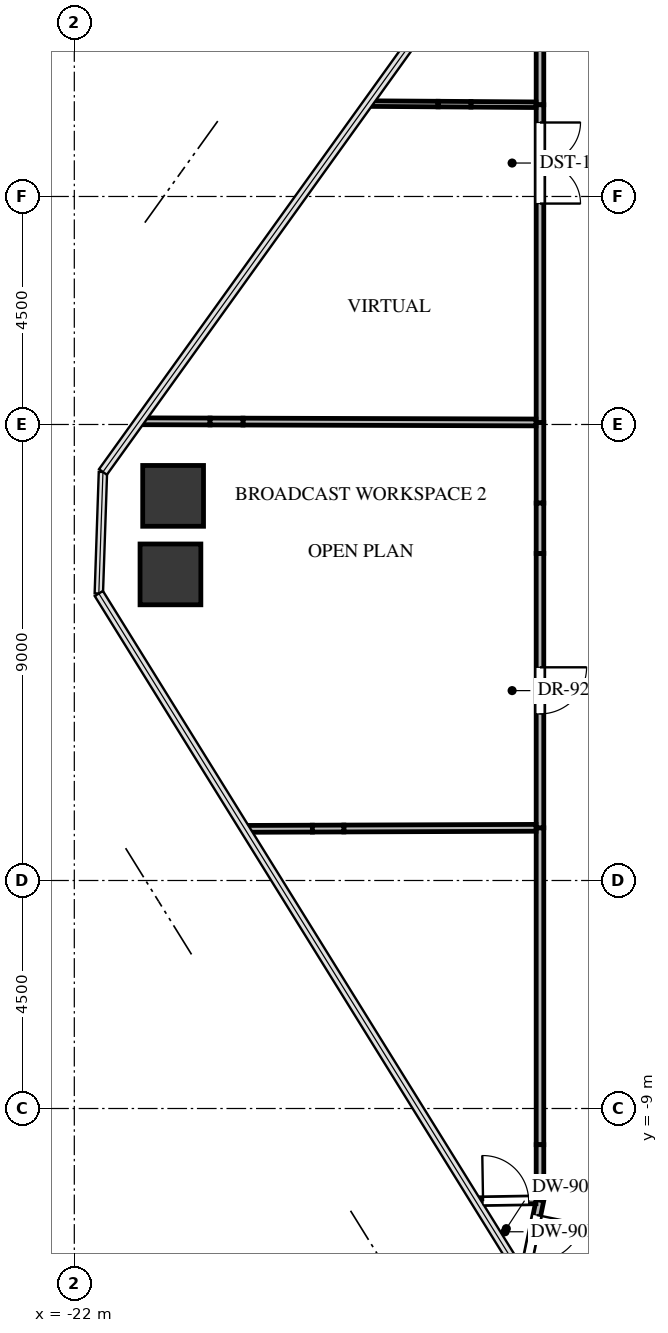
"""IFC4 building model, lengths in metres.
Left out: names, types, materials, properties, quantities, classifications, styles, units other than length and angle.
Written with IfcOpenShell. Run it as: python <this file> out.ifc"""

import sys

from ifc_helpers import new_model, si_unit, direction, frame, frame_2d, origin, origin_2d, place, context, subcontext, project, spatial, rectangle, extrude, source, transform, mapped, element, fill, save


model = new_model("IFC4")
c1 = context("Model", 3, precision=1e-05, world=origin(), true_north=direction((0.0, 1.0)))
c2 = subcontext(c1, "Body", "Model", "MODEL_VIEW")
j1 = project(units=[si_unit("LENGTHUNIT", "METRE"), si_unit("PLANEANGLEUNIT", "RADIAN")], contexts=[c1])
p1 = place(None, origin())
s1 = spatial("IfcSite", under=j1, at=p1, CompositionType="ELEMENT")
p2 = place(p1, origin())
s2 = spatial("IfcBuilding", under=s1, at=p2, CompositionType="ELEMENT")
p3 = place(p2, frame((0.0, 0.0, 137.1)))
s3 = spatial("IfcBuildingStorey", under=s2, at=p3, CompositionType="ELEMENT", Elevation=137.1)
m1 = source(origin(), c2, "Body", "SweptSolid", [
    extrude(rectangle(XDim=1.2, YDim=1.2, at=origin_2d()), origin(), (0.0, 0.0, 1.0), 3.0),
])
for number, where, z_axis, x_axis in (
    (1, (-20.103, 1.542, -0.24), (0.0, 0.0, 1.0), (1.0, 0.0, 0.0)),
    (2, (-20.05, 3.091, -0.24), (0.0, 0.0, 1.0), (1.0, 0.0, 0.0)),
):
    element("IfcColumn", number, at=place(p3, frame(where, z_axis=z_axis, x_axis=x_axis)), inside=s3, PredefinedType="COLUMN", context=c2, shape_type="MappedRepresentation", body=[
        mapped(m1, transform((0.0, 0.0, 0.0), x_axis=(1.0, 0.0, 0.0), y_axis=(0.0, 1.0, 0.0), z_axis=(0.0, 0.0, 1.0), scale=1.0)),
    ])
p4 = place(p3, frame((-12.81, 12.081, 0.0), z_axis=(0.0, 0.0, 1.0), x_axis=(0.0, -1.0, 0.0)))
e3 = element("IfcWall", 3, at=p4, inside=s3, PredefinedType="PARTITIONING", context=c2, shape_type="SweptSolid", body=[
    extrude(rectangle(XDim=1.271, YDim=0.15, at=frame_2d((0.635, 0.0))), origin(), (0.0, 0.0, 1.0), 2.745),
])
p5 = place(p3, frame((-12.81, -10.81, 0.0), z_axis=(0.0, 0.0, 1.0), x_axis=(-0.201786289638, -0.979429575474, 0.0)))
e4 = element("IfcWall", 4, at=p5, inside=s3, PredefinedType="PARTITIONING", context=c2, shape_type="SweptSolid", body=[
    extrude(rectangle(XDim=1.498, YDim=0.15, at=frame_2d((0.749, 0.0))), origin(), (0.0, 0.0, 1.0), 2.745),
])
p6 = place(p5, frame((0.299, 0.0, 0.0)))
e5 = element("IfcOpeningElement", 5, at=p6, cuts=e4, PredefinedType="OPENING", context=c2, shape_type="SweptSolid", body=[
    extrude(rectangle(XDim=0.9, YDim=2.05, at=frame_2d((0.45, 1.025))), frame((0.0, 0.085, 0.0), z_axis=(0.0, -1.0, 0.0), x_axis=(1.0, 0.0, 0.0)), (0.0, 0.0, 1.0), 0.17),
])
p7 = place(p3, frame((-12.81, -3.46, 0.0), z_axis=(0.0, 0.0, 1.0), x_axis=(0.0, -1.0, 0.0)))
e6 = element("IfcWall", 6, at=p7, inside=s3, PredefinedType="PARTITIONING", context=c2, shape_type="SweptSolid", body=[
    extrude(rectangle(XDim=6.254, YDim=0.15, at=frame_2d((3.127, 0.0))), origin(), (0.0, 0.0, 1.0), 2.08),
])
p8 = place(p3, frame((-12.81, -9.714, 0.0), z_axis=(0.0, 0.0, 1.0), x_axis=(0.0, -1.0, 0.0)))
e7 = element("IfcWall", 7, at=p8, inside=s3, PredefinedType="PARTITIONING", context=c2, shape_type="SweptSolid", body=[
    extrude(rectangle(XDim=1.004, YDim=0.15, at=frame_2d((0.502, 0.0))), origin(), (0.0, 0.0, 1.0), 2.08),
])
p9 = place(p3, frame((-12.81, 4.54, 0.0), z_axis=(0.0, 0.0, 1.0), x_axis=(0.0, -1.0, 0.0)))
e8 = element("IfcWall", 8, at=p9, inside=s3, PredefinedType="PARTITIONING", context=c2, shape_type="SweptSolid", body=[
    extrude(rectangle(XDim=1.592, YDim=0.15, at=frame_2d((0.796, 0.0))), origin(), (0.0, 0.0, 1.0), 2.745),
])
p10 = place(p3, frame((-12.81, 1.955, 0.0), z_axis=(0.0, 0.0, 1.0), x_axis=(0.0, -1.0, 0.0)))
e9 = element("IfcWall", 9, at=p10, inside=s3, PredefinedType="PARTITIONING", context=c2, shape_type="SweptSolid", body=[
    extrude(rectangle(XDim=5.415, YDim=0.15, at=frame_2d((2.708, 0.0))), origin(), (0.0, 0.0, 1.0), 2.745),
])
p11 = place(p10, frame((2.248, 0.0, 0.0)))
e10 = element("IfcOpeningElement", 10, at=p11, cuts=e9, PredefinedType="OPENING", context=c2, shape_type="SweptSolid", body=[
    extrude(rectangle(XDim=0.92, YDim=2.1, at=frame_2d((0.46, 1.05))), frame((0.0, 0.085, 0.0), z_axis=(0.0, -1.0, 0.0), x_axis=(1.0, 0.0, 0.0)), (0.0, 0.0, 1.0), 0.17),
])
p12 = place(p3, frame((-12.81, 2.948, 0.0), z_axis=(0.0, 0.0, 1.0), x_axis=(0.0, -1.0, 0.0)))
e11 = element("IfcWall", 11, at=p12, inside=s3, PredefinedType="PARTITIONING", context=c2, shape_type="SweptSolid", body=[
    extrude(rectangle(XDim=0.993, YDim=0.15, at=frame_2d((0.497, 0.0))), origin(), (0.0, 0.0, 1.0), 1.912),
])
p13 = place(p3, frame((-12.81, 10.81, 0.0), z_axis=(0.0, 0.0, 1.0), x_axis=(0.0, -1.0, 0.0)))
e12 = element("IfcWall", 12, at=p13, inside=s3, PredefinedType="PARTITIONING", context=c2, shape_type="SweptSolid", body=[
    extrude(rectangle(XDim=6.27, YDim=0.15, at=frame_2d((3.135, 0.0))), origin(), (0.0, 0.0, 1.0), 2.745),
])
p14 = place(p13, frame((0.35, 0.0, 0.0)))
e13 = element("IfcOpeningElement", 13, at=p14, cuts=e12, PredefinedType="OPENING", context=c2, shape_type="SweptSolid", body=[
    extrude(rectangle(XDim=1.6, YDim=2.15, at=frame_2d((0.8, 1.075))), frame((0.0, 0.085, 0.0), z_axis=(0.0, -1.0, 0.0), x_axis=(1.0, 0.0, 0.0)), (0.0, 0.0, 1.0), 0.17),
])
p15 = place(p3, frame((-12.889, 10.811, 0.0), z_axis=(0.0, 0.0, 1.0), x_axis=(-0.999976553189, 0.00684785161, 0.0)))
e14 = element("IfcWall", 14, at=p15, inside=s3, PredefinedType="MOVABLE", context=c2, shape_type="SweptSolid", body=[
    extrude(rectangle(XDim=1.283, YDim=0.11, at=frame_2d((0.642, 0.0))), origin(), (0.0, 0.0, 1.0), 2.745),
])
p16 = place(p3, frame((-14.821, 10.824, 0.0), z_axis=(0.0, 0.0, 1.0), x_axis=(-0.999976577186, 0.006844346527, 0.0)))
e15 = element("IfcWall", 15, at=p16, inside=s3, PredefinedType="MOVABLE", context=c2, shape_type="SweptSolid", body=[
    extrude(rectangle(XDim=1.391, YDim=0.11, at=frame_2d((0.696, 0.0))), origin(), (0.0, 0.0, 1.0), 2.745),
])
p17 = place(p3, frame((-14.172, 10.819, 0.0), z_axis=(0.0, 0.0, 1.0), x_axis=(-0.999977036192, 0.006776952806, 0.0)))
e16 = element("IfcWall", 16, at=p17, inside=s3, PredefinedType="MOVABLE", context=c2, shape_type="SweptSolid", body=[
    extrude(rectangle(XDim=0.648, YDim=0.11, at=frame_2d((0.324, 0.0))), origin(), (0.0, 0.0, 1.0), 2.08),
])
p18 = place(p3, frame((-14.076, -10.831, 0.0), z_axis=(0.0, 0.0, 1.0), x_axis=(0.999860796611, 0.016684945308, 0.0)))
e17 = element("IfcWall", 17, at=p18, inside=s3, PredefinedType="PARTITIONING", context=c2, shape_type="SweptSolid", body=[
    extrude(rectangle(XDim=1.185, YDim=0.135, at=frame_2d((0.593, 0.0))), origin(), (0.0, 0.0, 1.0), 2.745),
])
p19 = place(p18, frame((0.143, 0.0, 0.0)))
e18 = element("IfcOpeningElement", 18, at=p19, cuts=e17, PredefinedType="OPENING", context=c2, shape_type="SweptSolid", body=[
    extrude(rectangle(XDim=0.9, YDim=2.05, at=frame_2d((0.45, 1.025))), frame((0.0, 0.078, 0.0), z_axis=(0.0, -1.0, 0.0), x_axis=(1.0, 0.0, 0.0)), (0.0, 0.0, 1.0), 0.155),
])
p20 = place(p3, frame((-18.635, -3.481, 0.0), z_axis=(0.0, 0.0, 1.0), x_axis=(0.999993293726, 0.003662308345, 0.0)))
e19 = element("IfcWall", 19, at=p20, inside=s3, PredefinedType="PARTITIONING", context=c2, shape_type="SweptSolid", body=[
    extrude(rectangle(XDim=1.333, YDim=0.135, at=frame_2d((0.667, 0.0))), origin(), (0.0, 0.0, 1.0), 2.745),
])
p21 = place(p3, frame((-16.68, -3.474, 0.0), z_axis=(0.0, 0.0, 1.0), x_axis=(0.99999326446, 0.003670290797, 0.0)))
e20 = element("IfcWall", 20, at=p21, inside=s3, PredefinedType="PARTITIONING", context=c2, shape_type="SweptSolid", body=[
    extrude(rectangle(XDim=3.792, YDim=0.135, at=frame_2d((1.896, 0.0))), origin(), (0.0, 0.0, 1.0), 2.745),
])
p22 = place(p3, frame((-17.302, -3.476, 0.0), z_axis=(0.0, 0.0, 1.0), x_axis=(0.999993747188, 0.003536323664, 0.0)))
e21 = element("IfcWall", 21, at=p22, inside=s3, PredefinedType="PARTITIONING", context=c2, shape_type="SweptSolid", body=[
    extrude(rectangle(XDim=0.621, YDim=0.135, at=frame_2d((0.311, 0.0))), origin(), (0.0, 0.0, 1.0), 2.08),
])
p23 = place(p3, frame((-20.716, 4.563, 0.0), z_axis=(0.0, 0.0, 1.0), x_axis=(0.999995574274, -0.00297513559, 0.0)))
e22 = element("IfcWall", 22, at=p23, inside=s3, PredefinedType="PARTITIONING", context=c2, shape_type="SweptSolid", body=[
    extrude(rectangle(XDim=1.395, YDim=0.135, at=frame_2d((0.698, 0.0))), origin(), (0.0, 0.0, 1.0), 2.745),
])
p24 = place(p3, frame((-18.671, 4.557, 0.0), z_axis=(0.0, 0.0, 1.0), x_axis=(0.999995632297, -0.002955568918, 0.0)))
e23 = element("IfcWall", 23, at=p24, inside=s3, PredefinedType="PARTITIONING", context=c2, shape_type="SweptSolid", body=[
    extrude(rectangle(XDim=5.782, YDim=0.135, at=frame_2d((2.891, 0.0))), origin(), (0.0, 0.0, 1.0), 2.745),
])
p25 = place(p3, frame((-19.321, 4.559, 0.0), z_axis=(0.0, 0.0, 1.0), x_axis=(0.999996545211, -0.002628605263, 0.0)))
e24 = element("IfcWall", 24, at=p25, inside=s3, PredefinedType="PARTITIONING", context=c2, shape_type="SweptSolid", body=[
    extrude(rectangle(XDim=0.65, YDim=0.135, at=frame_2d((0.325, 0.0))), origin(), (0.0, 0.0, 1.0), 2.08),
])
m2 = source(origin(), c2, "Body", "SweptSolid", [
    extrude(rectangle(XDim=0.9, YDim=2.05, at=frame_2d((0.45, 1.025))), frame((0.0, 0.025, 0.0), z_axis=(0.0, -1.0, 0.0), x_axis=(1.0, 0.0, 0.0)), (0.0, 0.0, 1.0), 0.05),
])
p26 = place(p6, origin())
e25 = element("IfcDoor", 25, at=p26, inside=s3, OperationType="SINGLE_SWING_LEFT", PredefinedType="DOOR", context=c2, shape_type="MappedRepresentation", body=[
    mapped(m2, transform((0.0, 0.0, 0.0), x_axis=(1.0, 0.0, 0.0), y_axis=(0.0, 1.0, 0.0), z_axis=(0.0, 0.0, 1.0), scale=1.0)),
])
fill(e5, e25)
m3 = source(origin(), c2, "Body", "SweptSolid", [
    extrude(rectangle(XDim=0.92, YDim=2.1, at=frame_2d((0.46, 1.05))), frame((0.0, 0.025, 0.0), z_axis=(0.0, -1.0, 0.0), x_axis=(1.0, 0.0, 0.0)), (0.0, 0.0, 1.0), 0.05),
])
p27 = place(p11, origin())
e26 = element("IfcDoor", 26, at=p27, inside=s3, OperationType="SINGLE_SWING_LEFT", PredefinedType="DOOR", context=c2, shape_type="MappedRepresentation", body=[
    mapped(m3, transform((0.0, 0.0, 0.0), x_axis=(1.0, 0.0, 0.0), y_axis=(0.0, 1.0, 0.0), z_axis=(0.0, 0.0, 1.0), scale=1.0)),
])
fill(e10, e26)
m4 = source(origin(), c2, "Body", "SweptSolid", [
    extrude(rectangle(XDim=1.6, YDim=2.15, at=frame_2d((0.8, 1.075))), frame((0.0, 0.025, 0.0), z_axis=(0.0, -1.0, 0.0), x_axis=(1.0, 0.0, 0.0)), (0.0, 0.0, 1.0), 0.05),
])
p28 = place(p14, origin())
e27 = element("IfcDoor", 27, at=p28, inside=s3, OperationType="DOUBLE_DOOR_SINGLE_SWING", PredefinedType="DOOR", context=c2, shape_type="MappedRepresentation", body=[
    mapped(m4, transform((0.0, 0.0, 0.0), x_axis=(1.0, 0.0, 0.0), y_axis=(0.0, 1.0, 0.0), z_axis=(0.0, 0.0, 1.0), scale=1.0)),
])
fill(e13, e27)
p29 = place(p19, origin())
e28 = element("IfcDoor", 28, at=p29, inside=s3, OperationType="SINGLE_SWING_LEFT", PredefinedType="DOOR", context=c2, shape_type="MappedRepresentation", body=[
    mapped(m2, transform((0.0, 0.0, 0.0), x_axis=(1.0, 0.0, 0.0), y_axis=(0.0, 1.0, 0.0), z_axis=(0.0, 0.0, 1.0), scale=1.0)),
])
fill(e18, e28)
save(model, sys.argv[1])
